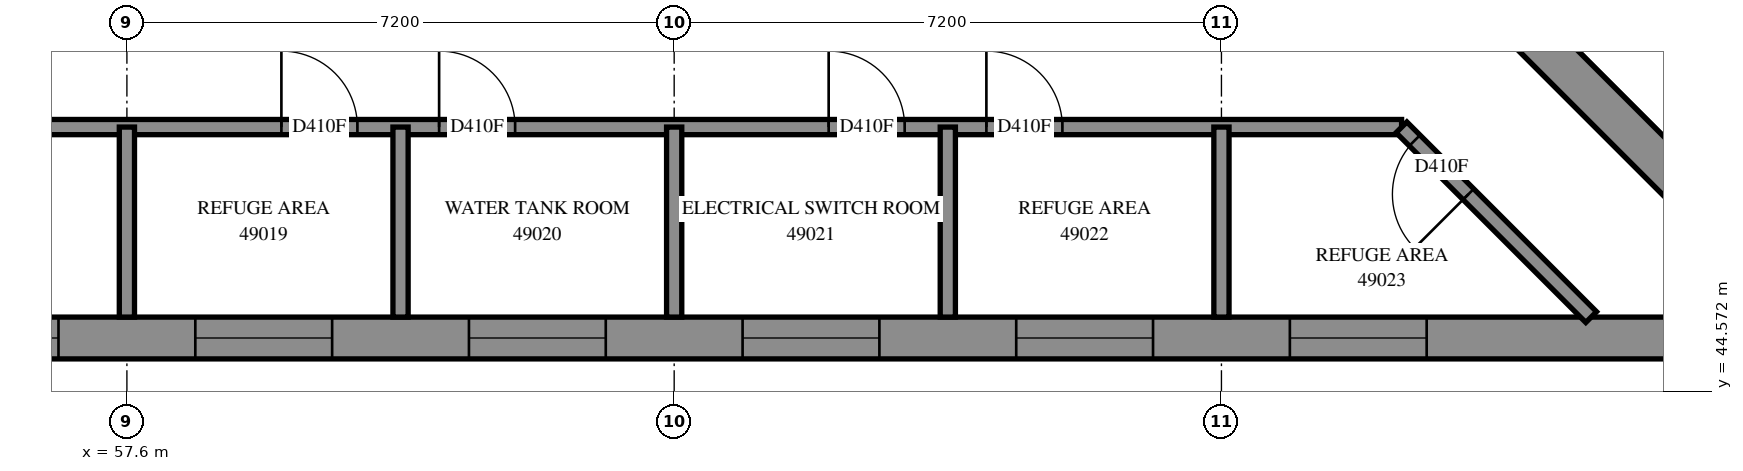
"""IFC4 building model, lengths in metres.
Left out: names, types, materials, properties, quantities, classifications, styles, units other than length and angle.
Written with IfcOpenShell. Run it as: python <this file> out.ifc"""

import sys

from ifc_helpers import new_model, si_unit, direction, frame, frame_2d, origin, place, context, subcontext, project, spatial, polyline, rectangle, outline, extrude, element, fill, save


model = new_model("IFC4")
c1 = context("Model", 3, precision=1e-05, world=origin(), true_north=direction((0.0, 1.0)))
c2 = subcontext(c1, "Body", "Model", "MODEL_VIEW")
j1 = project(units=[si_unit("LENGTHUNIT", "METRE"), si_unit("PLANEANGLEUNIT", "RADIAN")], contexts=[c1])
p1 = place(None, origin())
s1 = spatial("IfcSite", under=j1, at=p1, CompositionType="ELEMENT")
p2 = place(p1, origin())
s2 = spatial("IfcBuilding", under=s1, at=p2, CompositionType="ELEMENT")
p3 = place(p2, frame((0.0, 0.0, 180.4)))
s3 = spatial("IfcBuildingStorey", under=s2, at=p3, CompositionType="ELEMENT", Elevation=180.4)
p4 = place(p3, frame((76.071, 49.284, -0.3), z_axis=(0.0, 0.0, 1.0), x_axis=(0.7071035554, -0.707110007, 0.0)))
e1 = element("IfcWall", 1, at=p4, inside=s3, PredefinedType="SHEAR", context=c2, shape_type="SweptSolid", body=[
    extrude(rectangle(XDim=15.5, YDim=0.55, at=frame_2d((7.75, 0.0))), origin(), (0.0, 0.0, 1.0), 4.3),
])
p5 = place(p3, frame((52.475, 45.275, 0.0), z_axis=(0.0, 0.0, 1.0), x_axis=(1.0, 0.0, 0.0)))
e2 = element("IfcWall", 2, at=p5, inside=s3, PredefinedType="SOLIDWALL", context=c2, shape_type="SweptSolid", body=[
    extrude(outline(polyline([(-0.275, -0.275), (25.724, -0.275), (25.951, 0.275), (0.275, 0.275), (-0.275, -0.275)])), origin(), (0.0, 0.0, 1.0), 4.7),
])
p6 = place(p5, frame((2.425, 0.0, 0.9)))
e3 = element("IfcOpeningElement", 3, at=p6, cuts=e2, PredefinedType="OPENING", context=c2, shape_type="SweptSolid", body=[
    extrude(rectangle(XDim=1.8, YDim=3.6, at=frame_2d((0.9, 1.8))), frame((0.0, 0.285, 0.0), z_axis=(0.0, -1.0, 0.0), x_axis=(1.0, 0.0, 0.0)), (0.0, 0.0, 1.0), 0.57),
])
p7 = place(p5, frame((6.025, 0.0, 0.9)))
e4 = element("IfcOpeningElement", 4, at=p7, cuts=e2, PredefinedType="OPENING", context=c2, shape_type="SweptSolid", body=[
    extrude(rectangle(XDim=1.8, YDim=3.6, at=frame_2d((0.9, 1.8))), frame((0.0, 0.285, 0.0), z_axis=(0.0, -1.0, 0.0), x_axis=(1.0, 0.0, 0.0)), (0.0, 0.0, 1.0), 0.57),
])
p8 = place(p5, frame((9.625, 0.0, 0.9)))
e5 = element("IfcOpeningElement", 5, at=p8, cuts=e2, PredefinedType="OPENING", context=c2, shape_type="SweptSolid", body=[
    extrude(rectangle(XDim=1.8, YDim=3.6, at=frame_2d((0.9, 1.8))), frame((0.0, 0.285, 0.0), z_axis=(0.0, -1.0, 0.0), x_axis=(1.0, 0.0, 0.0)), (0.0, 0.0, 1.0), 0.57),
])
p9 = place(p5, frame((13.225, 0.0, 0.9)))
e6 = element("IfcOpeningElement", 6, at=p9, cuts=e2, PredefinedType="OPENING", context=c2, shape_type="SweptSolid", body=[
    extrude(rectangle(XDim=1.8, YDim=3.6, at=frame_2d((0.9, 1.8))), frame((0.0, 0.285, 0.0), z_axis=(0.0, -1.0, 0.0), x_axis=(1.0, 0.0, 0.0)), (0.0, 0.0, 1.0), 0.57),
])
p10 = place(p5, frame((16.825, 0.0, 0.9)))
e7 = element("IfcOpeningElement", 7, at=p10, cuts=e2, PredefinedType="OPENING", context=c2, shape_type="SweptSolid", body=[
    extrude(rectangle(XDim=1.8, YDim=3.6, at=frame_2d((0.9, 1.8))), frame((0.0, 0.285, 0.0), z_axis=(0.0, -1.0, 0.0), x_axis=(1.0, 0.0, 0.0)), (0.0, 0.0, 1.0), 0.57),
])
p11 = place(p5, frame((20.425, 0.0, 0.9)))
e8 = element("IfcOpeningElement", 8, at=p11, cuts=e2, PredefinedType="OPENING", context=c2, shape_type="SweptSolid", body=[
    extrude(rectangle(XDim=1.8, YDim=3.6, at=frame_2d((0.9, 1.8))), frame((0.0, 0.285, 0.0), z_axis=(0.0, -1.0, 0.0), x_axis=(1.0, 0.0, 0.0)), (0.0, 0.0, 1.0), 0.57),
])
p12 = place(p3, frame((55.25, 48.05, 0.0), z_axis=(0.0, 0.0, 1.0), x_axis=(1.0, 0.0, 0.0)))
e9 = element("IfcWall", 9, at=p12, inside=s3, PredefinedType="PARTITIONING", context=c2, shape_type="SweptSolid", body=[
    extrude(rectangle(XDim=19.12, YDim=0.2, at=frame_2d((9.56, 0.0))), origin(), (0.0, 0.0, 1.0), 4.7),
])
p13 = place(p12, frame((4.383, 0.0, 0.0)))
e10 = element("IfcOpeningElement", 10, at=p13, cuts=e9, PredefinedType="OPENING", context=c2, shape_type="SweptSolid", body=[
    extrude(rectangle(XDim=1.0, YDim=2.1, at=frame_2d((0.5, 1.05))), frame((0.0, 0.11, 0.0), z_axis=(0.0, -1.0, 0.0), x_axis=(1.0, 0.0, 0.0)), (0.0, 0.0, 1.0), 0.22),
])
p14 = place(p12, frame((6.457, 0.0, 0.0)))
e11 = element("IfcOpeningElement", 11, at=p14, cuts=e9, PredefinedType="OPENING", context=c2, shape_type="SweptSolid", body=[
    extrude(rectangle(XDim=1.0, YDim=2.1, at=frame_2d((0.5, 1.05))), frame((0.0, 0.11, 0.0), z_axis=(0.0, -1.0, 0.0), x_axis=(1.0, 0.0, 0.0)), (0.0, 0.0, 1.0), 0.22),
])
p15 = place(p12, frame((11.582, 0.0, 0.0)))
e12 = element("IfcOpeningElement", 12, at=p15, cuts=e9, PredefinedType="OPENING", context=c2, shape_type="SweptSolid", body=[
    extrude(rectangle(XDim=1.0, YDim=2.1, at=frame_2d((0.5, 1.05))), frame((0.0, 0.11, 0.0), z_axis=(0.0, -1.0, 0.0), x_axis=(1.0, 0.0, 0.0)), (0.0, 0.0, 1.0), 0.22),
])
p16 = place(p12, frame((13.658, 0.0, 0.0)))
e13 = element("IfcOpeningElement", 13, at=p16, cuts=e9, PredefinedType="OPENING", context=c2, shape_type="SweptSolid", body=[
    extrude(rectangle(XDim=1.0, YDim=2.1, at=frame_2d((0.5, 1.05))), frame((0.0, 0.11, 0.0), z_axis=(0.0, -1.0, 0.0), x_axis=(1.0, 0.0, 0.0)), (0.0, 0.0, 1.0), 0.22),
])
p17 = place(p3, frame((76.864, 45.55, 0.0), z_axis=(0.0, 0.0, 1.0), x_axis=(-0.7069226259, 0.7072908885, 0.0)))
e14 = element("IfcWall", 14, at=p17, inside=s3, PredefinedType="PARTITIONING", context=c2, shape_type="SweptSolid", body=[
    extrude(rectangle(XDim=3.53, YDim=0.2, at=frame_2d((1.765, 0.0))), origin(), (0.0, 0.0, 1.0), 4.7),
])
p18 = place(p17, frame((2.285, 0.0, 0.0)))
e15 = element("IfcOpeningElement", 15, at=p18, cuts=e14, PredefinedType="OPENING", context=c2, shape_type="SweptSolid", body=[
    extrude(rectangle(XDim=1.0, YDim=2.1, at=frame_2d((0.5, 1.05))), frame((0.0, 0.11, 0.0), z_axis=(0.0, -1.0, 0.0), x_axis=(1.0, 0.0, 0.0)), (0.0, 0.0, 1.0), 0.22),
])
for number, where, z_axis, x_axis in (
    (16, (57.6, 45.55, 0.0), (0.0, 0.0, 1.0), (0.0, 1.0, 0.0)),
    (17, (61.2, 45.55, 0.0), (0.0, 0.0, 1.0), (0.0, 1.0, 0.0)),
    (18, (64.8, 45.55, 0.0), (0.0, 0.0, 1.0), (0.0, 1.0, 0.0)),
    (19, (68.4, 45.55, 0.0), (0.0, 0.0, 1.0), (0.0, 1.0, 0.0)),
    (20, (72.0, 45.55, 0.0), (0.0, 0.0, 1.0), (0.0, 1.0, 0.0)),
):
    element("IfcWall", number, at=place(p3, frame(where, z_axis=z_axis, x_axis=x_axis)), inside=s3, PredefinedType="PARTITIONING", context=c2, shape_type="SweptSolid", body=[
        extrude(rectangle(XDim=2.5, YDim=0.2, at=frame_2d((1.25, 0.0))), origin(), (0.0, 0.0, 1.0), 4.7),
    ])
p19 = place(p6, origin())
e21 = element("IfcWindow", 21, at=p19, inside=s3, PartitioningType="SINGLE_PANEL", PredefinedType="WINDOW", context=c2, shape_type="SweptSolid", body=[
    extrude(rectangle(XDim=1.8, YDim=3.6, at=frame_2d((0.9, 1.8))), frame((0.0, 0.155, 0.0), z_axis=(0.0, -1.0, 0.0), x_axis=(1.0, 0.0, 0.0)), (0.0, 0.0, 1.0), 0.06),
])
fill(e3, e21)
p20 = place(p7, origin())
e22 = element("IfcWindow", 22, at=p20, inside=s3, PartitioningType="SINGLE_PANEL", PredefinedType="WINDOW", context=c2, shape_type="SweptSolid", body=[
    extrude(rectangle(XDim=1.8, YDim=3.6, at=frame_2d((0.9, 1.8))), frame((0.0, 0.155, 0.0), z_axis=(0.0, -1.0, 0.0), x_axis=(1.0, 0.0, 0.0)), (0.0, 0.0, 1.0), 0.06),
])
fill(e4, e22)
p21 = place(p8, origin())
e23 = element("IfcWindow", 23, at=p21, inside=s3, PartitioningType="SINGLE_PANEL", PredefinedType="WINDOW", context=c2, shape_type="SweptSolid", body=[
    extrude(rectangle(XDim=1.8, YDim=3.6, at=frame_2d((0.9, 1.8))), frame((0.0, 0.155, 0.0), z_axis=(0.0, -1.0, 0.0), x_axis=(1.0, 0.0, 0.0)), (0.0, 0.0, 1.0), 0.06),
])
fill(e5, e23)
p22 = place(p9, origin())
e24 = element("IfcWindow", 24, at=p22, inside=s3, PartitioningType="SINGLE_PANEL", PredefinedType="WINDOW", context=c2, shape_type="SweptSolid", body=[
    extrude(rectangle(XDim=1.8, YDim=3.6, at=frame_2d((0.9, 1.8))), frame((0.0, 0.155, 0.0), z_axis=(0.0, -1.0, 0.0), x_axis=(1.0, 0.0, 0.0)), (0.0, 0.0, 1.0), 0.06),
])
fill(e6, e24)
p23 = place(p10, origin())
e25 = element("IfcWindow", 25, at=p23, inside=s3, PartitioningType="SINGLE_PANEL", PredefinedType="WINDOW", context=c2, shape_type="SweptSolid", body=[
    extrude(rectangle(XDim=1.8, YDim=3.6, at=frame_2d((0.9, 1.8))), frame((0.0, 0.155, 0.0), z_axis=(0.0, -1.0, 0.0), x_axis=(1.0, 0.0, 0.0)), (0.0, 0.0, 1.0), 0.06),
])
fill(e7, e25)
p24 = place(p11, origin())
e26 = element("IfcWindow", 26, at=p24, inside=s3, PartitioningType="SINGLE_PANEL", PredefinedType="WINDOW", context=c2, shape_type="SweptSolid", body=[
    extrude(rectangle(XDim=1.8, YDim=3.6, at=frame_2d((0.9, 1.8))), frame((0.0, 0.155, 0.0), z_axis=(0.0, -1.0, 0.0), x_axis=(1.0, 0.0, 0.0)), (0.0, 0.0, 1.0), 0.06),
])
fill(e8, e26)
p25 = place(p13, origin())
e27 = element("IfcDoor", 27, at=p25, inside=s3, OperationType="SINGLE_SWING_LEFT", PredefinedType="DOOR", context=c2, shape_type="SweptSolid", body=[
    extrude(rectangle(XDim=1.0, YDim=2.1, at=frame_2d((0.5, 1.05))), frame((0.0, 0.025, 0.0), z_axis=(0.0, -1.0, 0.0), x_axis=(1.0, 0.0, 0.0)), (0.0, 0.0, 1.0), 0.05),
])
fill(e10, e27)
p26 = place(p14, origin())
e28 = element("IfcDoor", 28, at=p26, inside=s3, OperationType="SINGLE_SWING_RIGHT", PredefinedType="DOOR", context=c2, shape_type="SweptSolid", body=[
    extrude(rectangle(XDim=1.0, YDim=2.1, at=frame_2d((0.5, 1.05))), frame((0.0, 0.025, 0.0), z_axis=(0.0, -1.0, 0.0), x_axis=(1.0, 0.0, 0.0)), (0.0, 0.0, 1.0), 0.05),
])
fill(e11, e28)
p27 = place(p15, origin())
e29 = element("IfcDoor", 29, at=p27, inside=s3, OperationType="SINGLE_SWING_LEFT", PredefinedType="DOOR", context=c2, shape_type="SweptSolid", body=[
    extrude(rectangle(XDim=1.0, YDim=2.1, at=frame_2d((0.5, 1.05))), frame((0.0, 0.025, 0.0), z_axis=(0.0, -1.0, 0.0), x_axis=(1.0, 0.0, 0.0)), (0.0, 0.0, 1.0), 0.05),
])
fill(e12, e29)
p28 = place(p16, origin())
e30 = element("IfcDoor", 30, at=p28, inside=s3, OperationType="SINGLE_SWING_RIGHT", PredefinedType="DOOR", context=c2, shape_type="SweptSolid", body=[
    extrude(rectangle(XDim=1.0, YDim=2.1, at=frame_2d((0.5, 1.05))), frame((0.0, 0.025, 0.0), z_axis=(0.0, -1.0, 0.0), x_axis=(1.0, 0.0, 0.0)), (0.0, 0.0, 1.0), 0.05),
])
fill(e13, e30)
p29 = place(p18, origin())
e31 = element("IfcDoor", 31, at=p29, inside=s3, OperationType="SINGLE_SWING_LEFT", PredefinedType="DOOR", context=c2, shape_type="SweptSolid", body=[
    extrude(rectangle(XDim=1.0, YDim=2.1, at=frame_2d((0.5, 1.05))), frame((0.0, 0.025, 0.0), z_axis=(0.0, -1.0, 0.0), x_axis=(1.0, 0.0, 0.0)), (0.0, 0.0, 1.0), 0.05),
])
fill(e15, e31)
save(model, sys.argv[1])
